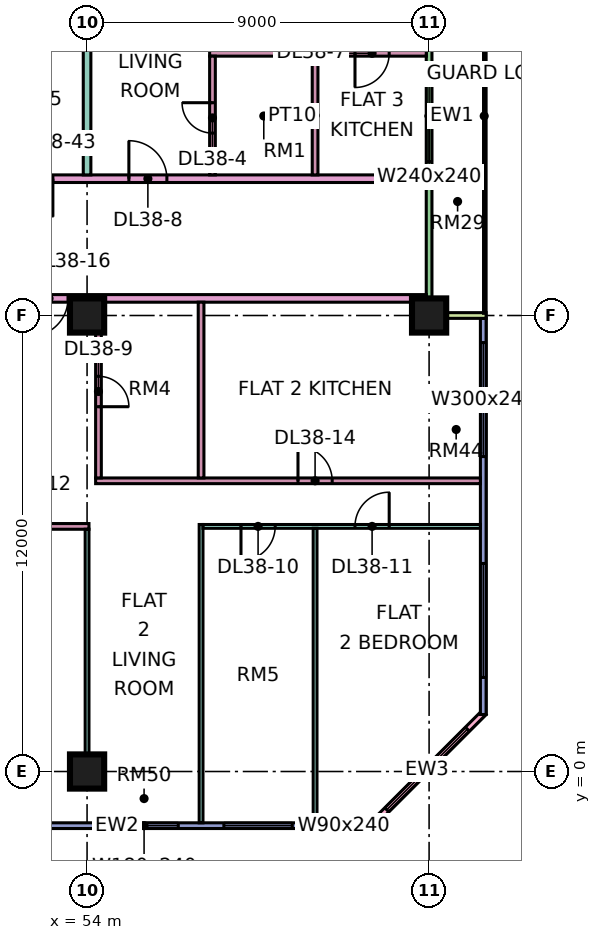
"""IFC4 building model, lengths in metres.
Left out: names, types, materials, properties, quantities, classifications, styles, units other than length and angle.
Written with IfcOpenShell. Run it as: python <this file> out.ifc"""

import sys

from ifc_helpers import new_model, si_unit, direction, frame, frame_2d, origin, origin_2d, place, context, subcontext, project, spatial, rectangle, extrude, element, fill, save


model = new_model("IFC4")
c1 = context("Model", 3, precision=1e-05, world=origin(), true_north=direction((0.0, 1.0)))
c2 = subcontext(c1, "Body", "Model", "MODEL_VIEW")
j1 = project(units=[si_unit("LENGTHUNIT", "METRE"), si_unit("PLANEANGLEUNIT", "RADIAN")], contexts=[c1])
p1 = place(None, origin())
s1 = spatial("IfcSite", under=j1, at=p1, CompositionType="ELEMENT")
p2 = place(p1, origin())
s2 = spatial("IfcBuilding", under=s1, at=p2, CompositionType="ELEMENT")
p3 = place(p2, frame((0.0, 0.0, 168.65)))
s3 = spatial("IfcBuildingStorey", under=s2, at=p3, CompositionType="ELEMENT", Elevation=168.65)
for number, where, z_axis, x_axis in (
    (1, (54.0, 0.0, 0.0), (0.0, 0.0, 1.0), (1.0, 0.0, 0.0)),
    (2, (54.0, 12.0, 0.0), (0.0, 0.0, 1.0), (1.0, 0.0, 0.0)),
    (3, (63.0, 12.0, 0.0), (0.0, 0.0, 1.0), (1.0, 0.0, 0.0)),
):
    element("IfcColumn", number, at=place(p3, frame(where, z_axis=z_axis, x_axis=x_axis)), inside=s3, PredefinedType="COLUMN", context=c2, shape_type="SweptSolid", body=[
        extrude(rectangle(XDim=0.9, YDim=0.9, at=origin_2d()), origin(), (0.0, 0.0, 1.0), 3.75),
    ])
p4 = place(p3, frame((48.075, -1.425, 0.0), z_axis=(0.0, 0.0, 1.0), x_axis=(1.0, 0.0, 0.0)))
e4 = element("IfcWall", 4, at=p4, inside=s3, PredefinedType="SOLIDWALL", context=c2, shape_type="SweptSolid", body=[
    extrude(rectangle(XDim=13.425, YDim=0.15, at=frame_2d((6.712, 0.0))), origin(), (0.0, 0.0, 1.0), 3.35),
])
p5 = place(p4, frame((1.462, 0.0, 0.45)))
e5 = element("IfcOpeningElement", 5, at=p5, cuts=e4, PredefinedType="OPENING", context=c2, shape_type="SweptSolid", body=[
    extrude(rectangle(XDim=3.0, YDim=2.4, at=frame_2d((1.5, 1.2))), frame((0.0, 0.085, 0.0), z_axis=(0.0, -1.0, 0.0), x_axis=(1.0, 0.0, 0.0)), (0.0, 0.0, 1.0), 0.17),
])
p6 = place(p4, frame((6.525, 0.0, 0.45)))
e6 = element("IfcOpeningElement", 6, at=p6, cuts=e4, PredefinedType="OPENING", context=c2, shape_type="SweptSolid", body=[
    extrude(rectangle(XDim=1.8, YDim=2.4, at=frame_2d((0.9, 1.2))), frame((0.0, 0.085, 0.0), z_axis=(0.0, -1.0, 0.0), x_axis=(1.0, 0.0, 0.0)), (0.0, 0.0, 1.0), 0.17),
])
p7 = place(p4, frame((9.525, 0.0, 0.45)))
e7 = element("IfcOpeningElement", 7, at=p7, cuts=e4, PredefinedType="OPENING", context=c2, shape_type="SweptSolid", body=[
    extrude(rectangle(XDim=1.8, YDim=2.4, at=frame_2d((0.9, 1.2))), frame((0.0, 0.085, 0.0), z_axis=(0.0, -1.0, 0.0), x_axis=(1.0, 0.0, 0.0)), (0.0, 0.0, 1.0), 0.17),
])
p8 = place(p4, frame((12.225, 0.0, 0.45)))
e8 = element("IfcOpeningElement", 8, at=p8, cuts=e4, PredefinedType="OPENING", context=c2, shape_type="SweptSolid", body=[
    extrude(rectangle(XDim=0.9, YDim=2.4, at=frame_2d((0.45, 1.2))), frame((0.0, 0.085, 0.0), z_axis=(0.0, -1.0, 0.0), x_axis=(1.0, 0.0, 0.0)), (0.0, 0.0, 1.0), 0.17),
])
p9 = place(p3, frame((61.447, -1.447, 0.0), z_axis=(0.0, 0.0, 1.0), x_axis=(0.707106781187, 0.707106781187, 0.0)))
e9 = element("IfcWall", 9, at=p9, inside=s3, PredefinedType="SOLIDWALL", context=c2, shape_type="SweptSolid", body=[
    extrude(rectangle(XDim=4.243, YDim=0.15, at=frame_2d((2.121, 0.0))), origin(), (0.0, 0.0, 1.0), 3.35),
])
p10 = place(p9, frame((0.621, 0.0, 0.45)))
e10 = element("IfcOpeningElement", 10, at=p10, cuts=e9, PredefinedType="OPENING", context=c2, shape_type="SweptSolid", body=[
    extrude(rectangle(XDim=3.0, YDim=2.4, at=frame_2d((1.5, 1.2))), frame((0.0, 0.085, 0.0), z_axis=(0.0, -1.0, 0.0), x_axis=(1.0, 0.0, 0.0)), (0.0, 0.0, 1.0), 0.17),
])
p11 = place(p3, frame((64.425, 1.5, 0.0), z_axis=(0.0, 0.0, 1.0), x_axis=(0.0, 1.0, 0.0)))
e11 = element("IfcWall", 11, at=p11, inside=s3, PredefinedType="SOLIDWALL", context=c2, shape_type="SweptSolid", body=[
    extrude(rectangle(XDim=10.425, YDim=0.15, at=frame_2d((5.212, 0.0))), origin(), (0.0, 0.0, 1.0), 3.35),
])
p12 = place(p11, frame((0.975, 0.0, 0.45)))
e12 = element("IfcOpeningElement", 12, at=p12, cuts=e11, PredefinedType="OPENING", context=c2, shape_type="SweptSolid", body=[
    extrude(rectangle(XDim=3.0, YDim=2.4, at=frame_2d((1.5, 1.2))), frame((0.0, 0.085, 0.0), z_axis=(0.0, -1.0, 0.0), x_axis=(1.0, 0.0, 0.0)), (0.0, 0.0, 1.0), 0.17),
])
p13 = place(p11, frame((6.788, 0.0, 0.45)))
e13 = element("IfcOpeningElement", 13, at=p13, cuts=e11, PredefinedType="OPENING", context=c2, shape_type="SweptSolid", body=[
    extrude(rectangle(XDim=3.0, YDim=2.4, at=frame_2d((1.5, 1.2))), frame((0.0, 0.085, 0.0), z_axis=(0.0, -1.0, 0.0), x_axis=(1.0, 0.0, 0.0)), (0.0, 0.0, 1.0), 0.17),
])
p14 = place(p3, frame((63.0, 12.075, 0.0), z_axis=(0.0, 0.0, 1.0), x_axis=(0.0, 1.0, 0.0)))
e14 = element("IfcWall", 14, at=p14, inside=s3, PredefinedType="SOLIDWALL", context=c2, shape_type="SweptSolid", body=[
    extrude(rectangle(XDim=10.35, YDim=0.15, at=frame_2d((5.175, 0.0))), origin(), (0.0, 0.0, 1.0), 3.35),
])
p15 = place(p14, frame((3.975, 0.0, 0.45)))
e15 = element("IfcOpeningElement", 15, at=p15, cuts=e14, PredefinedType="OPENING", context=c2, shape_type="SweptSolid", body=[
    extrude(rectangle(XDim=2.4, YDim=2.4, at=frame_2d((1.2, 1.2))), frame((0.0, 0.085, 0.0), z_axis=(0.0, -1.0, 0.0), x_axis=(1.0, 0.0, 0.0)), (0.0, 0.0, 1.0), 0.17),
])
p16 = place(p14, frame((8.587, 0.0, 0.45)))
e16 = element("IfcOpeningElement", 16, at=p16, cuts=e14, PredefinedType="OPENING", context=c2, shape_type="SweptSolid", body=[
    extrude(rectangle(XDim=1.2, YDim=2.4, at=frame_2d((0.6, 1.2))), frame((0.0, 0.085, 0.0), z_axis=(0.0, -1.0, 0.0), x_axis=(1.0, 0.0, 0.0)), (0.0, 0.0, 1.0), 0.17),
])
p17 = place(p3, frame((64.5, 12.0, 0.0), z_axis=(0.0, 0.0, 1.0), x_axis=(-1.0, 0.0, 0.0)))
e17 = element("IfcWall", 17, at=p17, inside=s3, PredefinedType="SOLIDWALL", context=c2, shape_type="SweptSolid", body=[
    extrude(rectangle(XDim=1.5, YDim=0.15, at=frame_2d((0.75, 0.0))), origin(), (0.0, 0.0, 1.0), 3.35),
])
p18 = place(p3, frame((40.65, 12.45, 0.0), z_axis=(0.0, 0.0, 1.0), x_axis=(1.0, 0.0, 0.0)))
e18 = element("IfcWall", 18, at=p18, inside=s3, PredefinedType="PARTITIONING", context=c2, shape_type="SweptSolid", body=[
    extrude(rectangle(XDim=22.276, YDim=0.2, at=frame_2d((11.138, 0.0))), origin(), (0.0, 0.0, 1.0), 3.35),
])
p19 = place(p18, frame((11.85, 0.0, 0.0)))
e19 = element("IfcOpeningElement", 19, at=p19, cuts=e18, PredefinedType="OPENING", context=c2, shape_type="SweptSolid", body=[
    extrude(rectangle(XDim=1.0, YDim=2.1, at=frame_2d((0.5, 1.05))), frame((0.0, 0.11, 0.0), z_axis=(0.0, -1.0, 0.0), x_axis=(1.0, 0.0, 0.0)), (0.0, 0.0, 1.0), 0.22),
])
p20 = place(p18, frame((1.05, 0.0, 0.0)))
e20 = element("IfcOpeningElement", 20, at=p20, cuts=e18, PredefinedType="OPENING", context=c2, shape_type="SweptSolid", body=[
    extrude(rectangle(XDim=1.0, YDim=2.1, at=frame_2d((0.5, 1.05))), frame((0.0, 0.11, 0.0), z_axis=(0.0, -1.0, 0.0), x_axis=(1.0, 0.0, 0.0)), (0.0, 0.0, 1.0), 0.22),
])
p21 = place(p3, frame((48.1, 6.45, 0.0), z_axis=(0.0, 0.0, 1.0), x_axis=(1.0, 0.0, 0.0)))
e21 = element("IfcWall", 21, at=p21, inside=s3, PredefinedType="PARTITIONING", context=c2, shape_type="SweptSolid", body=[
    extrude(rectangle(XDim=5.95, YDim=0.15, at=frame_2d((2.975, 0.0))), origin(), (0.0, 0.0, 1.0), 3.35),
])
p22 = place(p21, frame((3.95, 0.0, 0.0)))
e22 = element("IfcOpeningElement", 22, at=p22, cuts=e21, PredefinedType="OPENING", context=c2, shape_type="SweptSolid", body=[
    extrude(rectangle(XDim=0.9, YDim=2.1, at=frame_2d((0.45, 1.05))), frame((0.0, 0.085, 0.0), z_axis=(0.0, -1.0, 0.0), x_axis=(1.0, 0.0, 0.0)), (0.0, 0.0, 1.0), 0.17),
])
p23 = place(p3, frame((51.225, 15.6, 0.0), z_axis=(0.0, 0.0, 1.0), x_axis=(1.0, 0.0, 0.0)))
e23 = element("IfcWall", 23, at=p23, inside=s3, PredefinedType="PARTITIONING", context=c2, shape_type="SweptSolid", body=[
    extrude(rectangle(XDim=11.701, YDim=0.2, at=frame_2d((5.851, 0.0))), origin(), (0.0, 0.0, 1.0), 3.35),
])
p24 = place(p23, frame((3.875, 0.0, 0.0)))
e24 = element("IfcOpeningElement", 24, at=p24, cuts=e23, PredefinedType="OPENING", context=c2, shape_type="SweptSolid", body=[
    extrude(rectangle(XDim=1.0, YDim=2.1, at=frame_2d((0.5, 1.05))), frame((0.0, 0.11, 0.0), z_axis=(0.0, -1.0, 0.0), x_axis=(1.0, 0.0, 0.0)), (0.0, 0.0, 1.0), 0.22),
])
p25 = place(p23, frame((0.875, 0.0, 0.0)))
e25 = element("IfcOpeningElement", 25, at=p25, cuts=e23, PredefinedType="OPENING", context=c2, shape_type="SweptSolid", body=[
    extrude(rectangle(XDim=1.0, YDim=2.1, at=frame_2d((0.5, 1.05))), frame((0.0, 0.11, 0.0), z_axis=(0.0, -1.0, 0.0), x_axis=(1.0, 0.0, 0.0)), (0.0, 0.0, 1.0), 0.22),
])
p26 = place(p3, frame((54.0, 0.0, 0.0), z_axis=(0.0, 0.0, 1.0), x_axis=(0.0, 1.0, 0.0)))
e26 = element("IfcWall", 26, at=p26, inside=s3, PredefinedType="PARTITIONING", context=c2, shape_type="SweptSolid", body=[
    extrude(rectangle(XDim=6.375, YDim=0.1, at=frame_2d((3.188, 0.0))), origin(), (0.0, 0.0, 1.0), 3.35),
])
p27 = place(p3, frame((54.0, 15.7, 0.0), z_axis=(0.0, 0.0, 1.0), x_axis=(0.0, 1.0, 0.0)))
e27 = element("IfcWall", 27, at=p27, inside=s3, PredefinedType="PARTITIONING", context=c2, shape_type="SweptSolid", body=[
    extrude(rectangle(XDim=8.3, YDim=0.2, at=frame_2d((4.15, 0.0))), origin(), (0.0, 0.0, 1.0), 3.35),
])
p28 = place(p3, frame((54.225, 7.65, 0.0), z_axis=(0.0, 0.0, 1.0), x_axis=(1.0, 0.0, 0.0)))
e28 = element("IfcWall", 28, at=p28, inside=s3, PredefinedType="PARTITIONING", context=c2, shape_type="SweptSolid", body=[
    extrude(rectangle(XDim=10.125, YDim=0.15, at=frame_2d((5.062, 0.0))), origin(), (0.0, 0.0, 1.0), 3.35),
])
p29 = place(p28, frame((5.325, 0.0, 0.0)))
e29 = element("IfcOpeningElement", 29, at=p29, cuts=e28, PredefinedType="OPENING", context=c2, shape_type="SweptSolid", body=[
    extrude(rectangle(XDim=0.9, YDim=2.1, at=frame_2d((0.45, 1.05))), frame((0.0, 0.085, 0.0), z_axis=(0.0, -1.0, 0.0), x_axis=(1.0, 0.0, 0.0)), (0.0, 0.0, 1.0), 0.17),
])
p30 = place(p3, frame((54.3, 7.725, 0.0), z_axis=(0.0, 0.0, 1.0), x_axis=(0.0, 1.0, 0.0)))
e30 = element("IfcWall", 30, at=p30, inside=s3, PredefinedType="PARTITIONING", context=c2, shape_type="SweptSolid", body=[
    extrude(rectangle(XDim=4.625, YDim=0.15, at=frame_2d((2.312, 0.0))), origin(), (0.0, 0.0, 1.0), 3.35),
])
p31 = place(p30, frame((1.875, 0.0, 0.0)))
e31 = element("IfcOpeningElement", 31, at=p31, cuts=e30, PredefinedType="OPENING", context=c2, shape_type="SweptSolid", body=[
    extrude(rectangle(XDim=0.8, YDim=2.1, at=frame_2d((0.4, 1.05))), frame((0.0, 0.085, 0.0), z_axis=(0.0, -1.0, 0.0), x_axis=(1.0, 0.0, 0.0)), (0.0, 0.0, 1.0), 0.17),
])
p32 = place(p3, frame((57.0, -1.35, 0.0), z_axis=(0.0, 0.0, 1.0), x_axis=(0.0, 1.0, 0.0)))
e32 = element("IfcWall", 32, at=p32, inside=s3, PredefinedType="PARTITIONING", context=c2, shape_type="SweptSolid", body=[
    extrude(rectangle(XDim=7.85, YDim=0.1, at=frame_2d((3.925, 0.0))), origin(), (0.0, 0.0, 1.0), 3.35),
])
p33 = place(p3, frame((57.0, 7.725, 0.0), z_axis=(0.0, 0.0, 1.0), x_axis=(0.0, 1.0, 0.0)))
e33 = element("IfcWall", 33, at=p33, inside=s3, PredefinedType="PARTITIONING", context=c2, shape_type="SweptSolid", body=[
    extrude(rectangle(XDim=4.625, YDim=0.15, at=frame_2d((2.312, 0.0))), origin(), (0.0, 0.0, 1.0), 3.35),
])
p34 = place(p3, frame((57.05, 6.45, 0.0), z_axis=(0.0, 0.0, 1.0), x_axis=(1.0, 0.0, 0.0)))
e34 = element("IfcWall", 34, at=p34, inside=s3, PredefinedType="PARTITIONING", context=c2, shape_type="SweptSolid", body=[
    extrude(rectangle(XDim=7.3, YDim=0.1, at=frame_2d((3.65, 0.0))), origin(), (0.0, 0.0, 1.0), 3.35),
])
p35 = place(p34, frame((1.0, 0.0, 0.0)))
e35 = element("IfcOpeningElement", 35, at=p35, cuts=e34, PredefinedType="OPENING", context=c2, shape_type="SweptSolid", body=[
    extrude(rectangle(XDim=0.9, YDim=2.1, at=frame_2d((0.45, 1.05))), frame((0.0, 0.06, 0.0), z_axis=(0.0, -1.0, 0.0), x_axis=(1.0, 0.0, 0.0)), (0.0, 0.0, 1.0), 0.12),
])
p36 = place(p34, frame((4.0, 0.0, 0.0)))
e36 = element("IfcOpeningElement", 36, at=p36, cuts=e34, PredefinedType="OPENING", context=c2, shape_type="SweptSolid", body=[
    extrude(rectangle(XDim=0.9, YDim=2.1, at=frame_2d((0.45, 1.05))), frame((0.0, 0.06, 0.0), z_axis=(0.0, -1.0, 0.0), x_axis=(1.0, 0.0, 0.0)), (0.0, 0.0, 1.0), 0.12),
])
p37 = place(p3, frame((57.225, 18.9, 0.0), z_axis=(0.0, 0.0, 1.0), x_axis=(1.0, 0.0, 0.0)))
e37 = element("IfcWall", 37, at=p37, inside=s3, PredefinedType="PARTITIONING", context=c2, shape_type="SweptSolid", body=[
    extrude(rectangle(XDim=5.701, YDim=0.15, at=frame_2d((2.851, 0.0))), origin(), (0.0, 0.0, 1.0), 3.35),
])
p38 = place(p37, frame((3.825, 0.0, 0.0)))
e38 = element("IfcOpeningElement", 38, at=p38, cuts=e37, PredefinedType="OPENING", context=c2, shape_type="SweptSolid", body=[
    extrude(rectangle(XDim=0.9, YDim=2.1, at=frame_2d((0.45, 1.05))), frame((0.0, 0.085, 0.0), z_axis=(0.0, -1.0, 0.0), x_axis=(1.0, 0.0, 0.0)), (0.0, 0.0, 1.0), 0.17),
])
p39 = place(p3, frame((57.3, 15.7, 0.0), z_axis=(0.0, 0.0, 1.0), x_axis=(0.0, 1.0, 0.0)))
e39 = element("IfcWall", 39, at=p39, inside=s3, PredefinedType="PARTITIONING", context=c2, shape_type="SweptSolid", body=[
    extrude(rectangle(XDim=3.125, YDim=0.15, at=frame_2d((1.562, 0.0))), origin(), (0.0, 0.0, 1.0), 3.35),
])
p40 = place(p39, frame((1.1, 0.0, 0.0)))
e40 = element("IfcOpeningElement", 40, at=p40, cuts=e39, PredefinedType="OPENING", context=c2, shape_type="SweptSolid", body=[
    extrude(rectangle(XDim=0.8, YDim=2.1, at=frame_2d((0.4, 1.05))), frame((0.0, 0.085, 0.0), z_axis=(0.0, -1.0, 0.0), x_axis=(1.0, 0.0, 0.0)), (0.0, 0.0, 1.0), 0.17),
])
p41 = place(p3, frame((60.0, -1.351, 0.0), z_axis=(0.0, 0.0, 1.0), x_axis=(0.0, 1.0, 0.0)))
e41 = element("IfcWall", 41, at=p41, inside=s3, PredefinedType="PARTITIONING", context=c2, shape_type="SweptSolid", body=[
    extrude(rectangle(XDim=7.751, YDim=0.1, at=frame_2d((3.875, 0.0))), origin(), (0.0, 0.0, 1.0), 3.35),
])
p42 = place(p3, frame((60.0, 15.7, 0.0), z_axis=(0.0, 0.0, 1.0), x_axis=(0.0, 1.0, 0.0)))
e42 = element("IfcWall", 42, at=p42, inside=s3, PredefinedType="PARTITIONING", context=c2, shape_type="SweptSolid", body=[
    extrude(rectangle(XDim=3.125, YDim=0.15, at=frame_2d((1.562, 0.0))), origin(), (0.0, 0.0, 1.0), 3.35),
])
p43 = place(p6, origin())
e43 = element("IfcWindow", 43, at=p43, inside=s3, PartitioningType="SINGLE_PANEL", PredefinedType="WINDOW", context=c2, shape_type="SweptSolid", body=[
    extrude(rectangle(XDim=1.8, YDim=2.4, at=frame_2d((0.9, 1.2))), frame((0.0, 0.03, 0.0), z_axis=(0.0, -1.0, 0.0), x_axis=(1.0, 0.0, 0.0)), (0.0, 0.0, 1.0), 0.06),
])
fill(e6, e43)
p44 = place(p7, origin())
e44 = element("IfcWindow", 44, at=p44, inside=s3, PartitioningType="SINGLE_PANEL", PredefinedType="WINDOW", context=c2, shape_type="SweptSolid", body=[
    extrude(rectangle(XDim=1.8, YDim=2.4, at=frame_2d((0.9, 1.2))), frame((0.0, 0.03, 0.0), z_axis=(0.0, -1.0, 0.0), x_axis=(1.0, 0.0, 0.0)), (0.0, 0.0, 1.0), 0.06),
])
fill(e7, e44)
p45 = place(p8, origin())
e45 = element("IfcWindow", 45, at=p45, inside=s3, PartitioningType="SINGLE_PANEL", PredefinedType="WINDOW", context=c2, shape_type="SweptSolid", body=[
    extrude(rectangle(XDim=0.9, YDim=2.4, at=frame_2d((0.45, 1.2))), frame((0.0, 0.03, 0.0), z_axis=(0.0, -1.0, 0.0), x_axis=(1.0, 0.0, 0.0)), (0.0, 0.0, 1.0), 0.06),
])
fill(e8, e45)
p46 = place(p10, origin())
e46 = element("IfcWindow", 46, at=p46, inside=s3, PartitioningType="SINGLE_PANEL", PredefinedType="WINDOW", context=c2, shape_type="SweptSolid", body=[
    extrude(rectangle(XDim=3.0, YDim=2.4, at=frame_2d((1.5, 1.2))), frame((0.0, 0.03, 0.0), z_axis=(0.0, -1.0, 0.0), x_axis=(1.0, 0.0, 0.0)), (0.0, 0.0, 1.0), 0.06),
])
fill(e10, e46)
p47 = place(p12, origin())
e47 = element("IfcWindow", 47, at=p47, inside=s3, PartitioningType="SINGLE_PANEL", PredefinedType="WINDOW", context=c2, shape_type="SweptSolid", body=[
    extrude(rectangle(XDim=3.0, YDim=2.4, at=frame_2d((1.5, 1.2))), frame((0.0, 0.03, 0.0), z_axis=(0.0, -1.0, 0.0), x_axis=(1.0, 0.0, 0.0)), (0.0, 0.0, 1.0), 0.06),
])
fill(e12, e47)
p48 = place(p13, origin())
e48 = element("IfcWindow", 48, at=p48, inside=s3, PartitioningType="SINGLE_PANEL", PredefinedType="WINDOW", context=c2, shape_type="SweptSolid", body=[
    extrude(rectangle(XDim=3.0, YDim=2.4, at=frame_2d((1.5, 1.2))), frame((0.0, 0.03, 0.0), z_axis=(0.0, -1.0, 0.0), x_axis=(1.0, 0.0, 0.0)), (0.0, 0.0, 1.0), 0.06),
])
fill(e13, e48)
p49 = place(p15, origin())
e49 = element("IfcWindow", 49, at=p49, inside=s3, PartitioningType="SINGLE_PANEL", PredefinedType="WINDOW", context=c2, shape_type="SweptSolid", body=[
    extrude(rectangle(XDim=2.4, YDim=2.4, at=frame_2d((1.2, 1.2))), frame((0.0, 0.03, 0.0), z_axis=(0.0, -1.0, 0.0), x_axis=(1.0, 0.0, 0.0)), (0.0, 0.0, 1.0), 0.06),
])
fill(e15, e49)
p50 = place(p40, frame((0.8, 0.0, 0.0), z_axis=(0.0, 0.0, 1.0), x_axis=(-1.0, 0.0, 0.0)))
e50 = element("IfcDoor", 50, at=p50, inside=s3, OperationType="SINGLE_SWING_RIGHT", PredefinedType="DOOR", context=c2, shape_type="SweptSolid", body=[
    extrude(rectangle(XDim=0.8, YDim=2.1, at=frame_2d((0.4, 1.05))), frame((0.0, 0.025, 0.0), z_axis=(0.0, -1.0, 0.0), x_axis=(1.0, 0.0, 0.0)), (0.0, 0.0, 1.0), 0.05),
])
fill(e40, e50)
p51 = place(p38, frame((0.9, 0.0, 0.0), z_axis=(0.0, 0.0, 1.0), x_axis=(-1.0, 0.0, 0.0)))
e51 = element("IfcDoor", 51, at=p51, inside=s3, OperationType="SINGLE_SWING_LEFT", PredefinedType="DOOR", context=c2, shape_type="SweptSolid", body=[
    extrude(rectangle(XDim=0.9, YDim=2.1, at=frame_2d((0.45, 1.05))), frame((0.0, 0.025, 0.0), z_axis=(0.0, -1.0, 0.0), x_axis=(1.0, 0.0, 0.0)), (0.0, 0.0, 1.0), 0.05),
])
fill(e38, e51)
p52 = place(p24, origin())
e52 = element("IfcDoor", 52, at=p52, inside=s3, OperationType="SINGLE_SWING_LEFT", PredefinedType="DOOR", context=c2, shape_type="SweptSolid", body=[
    extrude(rectangle(XDim=1.0, YDim=2.1, at=frame_2d((0.5, 1.05))), frame((0.0, 0.025, 0.0), z_axis=(0.0, -1.0, 0.0), x_axis=(1.0, 0.0, 0.0)), (0.0, 0.0, 1.0), 0.05),
])
fill(e24, e52)
p53 = place(p31, frame((0.8, 0.0, 0.0), z_axis=(0.0, 0.0, 1.0), x_axis=(-1.0, 0.0, 0.0)))
e53 = element("IfcDoor", 53, at=p53, inside=s3, OperationType="SINGLE_SWING_LEFT", PredefinedType="DOOR", context=c2, shape_type="SweptSolid", body=[
    extrude(rectangle(XDim=0.8, YDim=2.1, at=frame_2d((0.4, 1.05))), frame((0.0, 0.025, 0.0), z_axis=(0.0, -1.0, 0.0), x_axis=(1.0, 0.0, 0.0)), (0.0, 0.0, 1.0), 0.05),
])
fill(e31, e53)
p54 = place(p35, frame((0.9, 0.0, 0.0), z_axis=(0.0, 0.0, 1.0), x_axis=(-1.0, 0.0, 0.0)))
e54 = element("IfcDoor", 54, at=p54, inside=s3, OperationType="SINGLE_SWING_LEFT", PredefinedType="DOOR", context=c2, shape_type="SweptSolid", body=[
    extrude(rectangle(XDim=0.9, YDim=2.1, at=frame_2d((0.45, 1.05))), frame((0.0, 0.025, 0.0), z_axis=(0.0, -1.0, 0.0), x_axis=(1.0, 0.0, 0.0)), (0.0, 0.0, 1.0), 0.05),
])
fill(e35, e54)
p55 = place(p36, frame((0.9, 0.0, 0.0), z_axis=(0.0, 0.0, 1.0), x_axis=(-1.0, 0.0, 0.0)))
e55 = element("IfcDoor", 55, at=p55, inside=s3, OperationType="SINGLE_SWING_RIGHT", PredefinedType="DOOR", context=c2, shape_type="SweptSolid", body=[
    extrude(rectangle(XDim=0.9, YDim=2.1, at=frame_2d((0.45, 1.05))), frame((0.0, 0.025, 0.0), z_axis=(0.0, -1.0, 0.0), x_axis=(1.0, 0.0, 0.0)), (0.0, 0.0, 1.0), 0.05),
])
fill(e36, e55)
p56 = place(p29, origin())
e56 = element("IfcDoor", 56, at=p56, inside=s3, OperationType="SINGLE_SWING_LEFT", PredefinedType="DOOR", context=c2, shape_type="SweptSolid", body=[
    extrude(rectangle(XDim=0.9, YDim=2.1, at=frame_2d((0.45, 1.05))), frame((0.0, 0.025, 0.0), z_axis=(0.0, -1.0, 0.0), x_axis=(1.0, 0.0, 0.0)), (0.0, 0.0, 1.0), 0.05),
])
fill(e29, e56)
p57 = place(p19, frame((1.0, 0.0, 0.0), z_axis=(0.0, 0.0, 1.0), x_axis=(-1.0, 0.0, 0.0)))
e57 = element("IfcDoor", 57, at=p57, inside=s3, OperationType="SINGLE_SWING_LEFT", PredefinedType="DOOR", context=c2, shape_type="SweptSolid", body=[
    extrude(rectangle(XDim=1.0, YDim=2.1, at=frame_2d((0.5, 1.05))), frame((0.0, 0.025, 0.0), z_axis=(0.0, -1.0, 0.0), x_axis=(1.0, 0.0, 0.0)), (0.0, 0.0, 1.0), 0.05),
])
fill(e19, e57)
p58 = place(p25, origin())
e58 = element("IfcDoor", 58, at=p58, inside=s3, OperationType="SINGLE_SWING_RIGHT", PredefinedType="DOOR", context=c2, shape_type="SweptSolid", body=[
    extrude(rectangle(XDim=1.0, YDim=2.1, at=frame_2d((0.5, 1.05))), frame((0.0, 0.025, 0.0), z_axis=(0.0, -1.0, 0.0), x_axis=(1.0, 0.0, 0.0)), (0.0, 0.0, 1.0), 0.05),
])
fill(e25, e58)
save(model, sys.argv[1])
